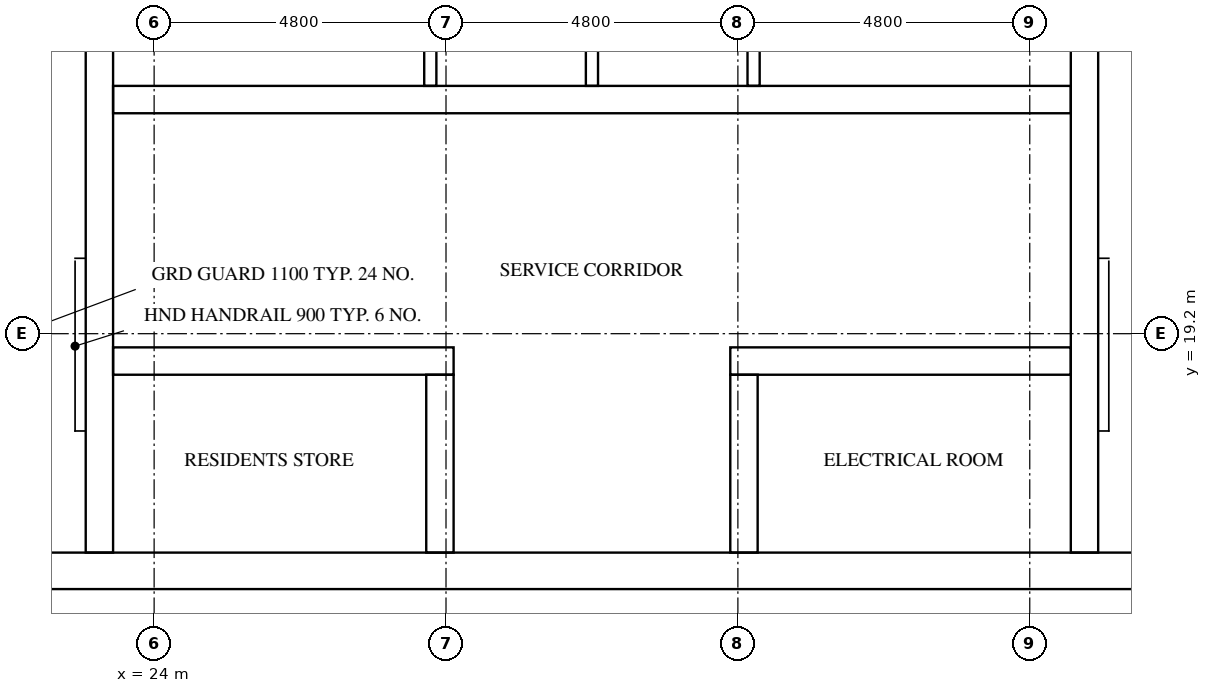
"""IFC4 building model, lengths in metres.
Left out: names, types, materials, properties, quantities, classifications, styles, units other than length and angle.
Written with IfcOpenShell. Run it as: python <this file> out.ifc"""

import sys

from ifc_helpers import new_model, si_unit, direction, frame, frame_2d, origin, place, context, subcontext, project, spatial, rectangle, extrude, element, fill, save


model = new_model("IFC4")
c1 = context("Model", 3, precision=1e-05, world=origin(), true_north=direction((0.0, 1.0)))
c2 = subcontext(c1, "Body", "Model", "MODEL_VIEW")
j1 = project(units=[si_unit("LENGTHUNIT", "METRE"), si_unit("PLANEANGLEUNIT", "RADIAN")], contexts=[c1])
p1 = place(None, origin())
s1 = spatial("IfcSite", under=j1, at=p1, CompositionType="ELEMENT")
p2 = place(p1, origin())
s2 = spatial("IfcBuilding", under=s1, at=p2, CompositionType="ELEMENT")
p3 = place(p2, frame((0.0, 0.0, 242.2)))
s3 = spatial("IfcBuildingStorey", under=s2, at=p3, CompositionType="ELEMENT", Elevation=242.2)
p4 = place(p3, frame((15.0, 15.3, 0.0), z_axis=(0.0, 0.0, 1.0), x_axis=(1.0, 0.0, 0.0)))
e1 = element("IfcWall", 1, at=p4, inside=s3, PredefinedType="SHEAR", context=c2, shape_type="SweptSolid", body=[
    extrude(rectangle(XDim=32.4, YDim=0.6, at=frame_2d((16.2, 0.0))), origin(), (0.0, 0.0, 1.0), 3.2),
])
p5 = place(p4, frame((15.3, 0.0, 0.0)))
e2 = element("IfcOpeningElement", 2, at=p5, cuts=e1, PredefinedType="OPENING", context=c2, shape_type="SweptSolid", body=[
    extrude(rectangle(XDim=1.8, YDim=2.1, at=frame_2d((0.9, 1.05))), frame((0.0, 0.31, 0.0), z_axis=(0.0, -1.0, 0.0), x_axis=(1.0, 0.0, 0.0)), (0.0, 0.0, 1.0), 0.62),
])
p6 = place(p3, frame((23.1, 15.6, 0.0), z_axis=(0.0, 0.0, 1.0), x_axis=(0.0, 1.0, 0.0)))
e3 = element("IfcWall", 3, at=p6, inside=s3, PredefinedType="SHEAR", context=c2, shape_type="SweptSolid", body=[
    extrude(rectangle(XDim=21.6, YDim=0.45, at=frame_2d((10.8, 0.0))), origin(), (0.0, 0.0, 1.0), 3.2),
])
p7 = place(p3, frame((39.3, 15.6, 0.0), z_axis=(0.0, 0.0, 1.0), x_axis=(0.0, 1.0, 0.0)))
e4 = element("IfcWall", 4, at=p7, inside=s3, PredefinedType="SHEAR", context=c2, shape_type="SweptSolid", body=[
    extrude(rectangle(XDim=8.65, YDim=0.45, at=frame_2d((4.325, 0.0))), origin(), (0.0, 0.0, 1.0), 3.2),
])
p8 = place(p3, frame((23.325, 18.75, 0.0), z_axis=(0.0, 0.0, 1.0), x_axis=(1.0, 0.0, 0.0)))
e5 = element("IfcWall", 5, at=p8, inside=s3, PredefinedType="SHEAR", context=c2, shape_type="SweptSolid", body=[
    extrude(rectangle(XDim=5.6, YDim=0.45, at=frame_2d((2.8, 0.0))), origin(), (0.0, 0.0, 1.0), 3.2),
])
p9 = place(p8, frame((2.075, 0.0, 0.0)))
e6 = element("IfcOpeningElement", 6, at=p9, cuts=e5, PredefinedType="OPENING", context=c2, shape_type="SweptSolid", body=[
    extrude(rectangle(XDim=1.0, YDim=2.1, at=frame_2d((0.5, 1.05))), frame((0.0, 0.235, 0.0), z_axis=(0.0, -1.0, 0.0), x_axis=(1.0, 0.0, 0.0)), (0.0, 0.0, 1.0), 0.47),
])
p10 = place(p3, frame((33.475, 18.75, 0.0), z_axis=(0.0, 0.0, 1.0), x_axis=(1.0, 0.0, 0.0)))
e7 = element("IfcWall", 7, at=p10, inside=s3, PredefinedType="SHEAR", context=c2, shape_type="SweptSolid", body=[
    extrude(rectangle(XDim=5.6, YDim=0.45, at=frame_2d((2.8, 0.0))), origin(), (0.0, 0.0, 1.0), 3.2),
])
p11 = place(p10, frame((2.525, 0.0, 0.0)))
e8 = element("IfcOpeningElement", 8, at=p11, cuts=e7, PredefinedType="OPENING", context=c2, shape_type="SweptSolid", body=[
    extrude(rectangle(XDim=1.0, YDim=2.1, at=frame_2d((0.5, 1.05))), frame((0.0, 0.235, 0.0), z_axis=(0.0, -1.0, 0.0), x_axis=(1.0, 0.0, 0.0)), (0.0, 0.0, 1.0), 0.47),
])
p12 = place(p3, frame((23.325, 23.05, 0.0), z_axis=(0.0, 0.0, 1.0), x_axis=(1.0, 0.0, 0.0)))
e9 = element("IfcWall", 9, at=p12, inside=s3, PredefinedType="SHEAR", context=c2, shape_type="SweptSolid", body=[
    extrude(rectangle(XDim=15.75, YDim=0.45, at=frame_2d((7.875, 0.0))), origin(), (0.0, 0.0, 1.0), 3.2),
])
p13 = place(p12, frame((2.058, 0.0, 0.0)))
e10 = element("IfcOpeningElement", 10, at=p13, cuts=e9, PredefinedType="OPENING", context=c2, shape_type="SweptSolid", body=[
    extrude(rectangle(XDim=1.0, YDim=2.1, at=frame_2d((0.5, 1.05))), frame((0.0, 0.235, 0.0), z_axis=(0.0, -1.0, 0.0), x_axis=(1.0, 0.0, 0.0)), (0.0, 0.0, 1.0), 0.47),
])
p14 = place(p12, frame((12.692, 0.0, 0.0)))
e11 = element("IfcOpeningElement", 11, at=p14, cuts=e9, PredefinedType="OPENING", context=c2, shape_type="SweptSolid", body=[
    extrude(rectangle(XDim=1.0, YDim=2.1, at=frame_2d((0.5, 1.05))), frame((0.0, 0.235, 0.0), z_axis=(0.0, -1.0, 0.0), x_axis=(1.0, 0.0, 0.0)), (0.0, 0.0, 1.0), 0.47),
])
for number, where, z_axis, x_axis in (
    (12, (28.7, 15.6, 0.0), (0.0, 0.0, 1.0), (0.0, 1.0, 0.0)),
    (13, (33.7, 15.6, 0.0), (0.0, 0.0, 1.0), (0.0, 1.0, 0.0)),
):
    element("IfcWall", number, at=place(p3, frame(where, z_axis=z_axis, x_axis=x_axis)), inside=s3, PredefinedType="SHEAR", context=c2, shape_type="SweptSolid", body=[
        extrude(rectangle(XDim=2.925, YDim=0.45, at=frame_2d((1.462, 0.0))), origin(), (0.0, 0.0, 1.0), 3.2),
    ])
for number, where, z_axis, x_axis in (
    (14, (28.542, 23.275, 0.0), (0.0, 0.0, 1.0), (0.0, 1.0, 0.0)),
    (15, (31.2, 23.275, 0.0), (0.0, 0.0, 1.0), (0.0, 1.0, 0.0)),
    (16, (33.858, 23.275, 0.0), (0.0, 0.0, 1.0), (0.0, 1.0, 0.0)),
):
    element("IfcWall", number, at=place(p3, frame(where, z_axis=z_axis, x_axis=x_axis)), inside=s3, PredefinedType="SOLIDWALL", context=c2, shape_type="SweptSolid", body=[
        extrude(rectangle(XDim=2.65, YDim=0.2, at=frame_2d((1.325, 0.0))), origin(), (0.0, 0.0, 1.0), 3.2),
    ])
p15 = place(p5, frame((1.8, 0.0, 0.0), z_axis=(0.0, 0.0, 1.0), x_axis=(-1.0, 0.0, 0.0)))
e17 = element("IfcDoor", 17, at=p15, inside=s3, OperationType="DOUBLE_DOOR_SINGLE_SWING", PredefinedType="DOOR", context=c2, shape_type="SweptSolid", body=[
    extrude(rectangle(XDim=1.8, YDim=2.1, at=frame_2d((0.9, 1.05))), frame((0.0, 0.025, 0.0), z_axis=(0.0, -1.0, 0.0), x_axis=(1.0, 0.0, 0.0)), (0.0, 0.0, 1.0), 0.05),
])
fill(e2, e17)
p16 = place(p13, frame((1.0, 0.0, 0.0), z_axis=(0.0, 0.0, 1.0), x_axis=(-1.0, 0.0, 0.0)))
e18 = element("IfcDoor", 18, at=p16, inside=s3, OperationType="SINGLE_SWING_RIGHT", PredefinedType="DOOR", context=c2, shape_type="SweptSolid", body=[
    extrude(rectangle(XDim=1.0, YDim=2.1, at=frame_2d((0.5, 1.05))), frame((0.0, 0.025, 0.0), z_axis=(0.0, -1.0, 0.0), x_axis=(1.0, 0.0, 0.0)), (0.0, 0.0, 1.0), 0.05),
])
fill(e10, e18)
p17 = place(p14, frame((1.0, 0.0, 0.0), z_axis=(0.0, 0.0, 1.0), x_axis=(-1.0, 0.0, 0.0)))
e19 = element("IfcDoor", 19, at=p17, inside=s3, OperationType="SINGLE_SWING_LEFT", PredefinedType="DOOR", context=c2, shape_type="SweptSolid", body=[
    extrude(rectangle(XDim=1.0, YDim=2.1, at=frame_2d((0.5, 1.05))), frame((0.0, 0.025, 0.0), z_axis=(0.0, -1.0, 0.0), x_axis=(1.0, 0.0, 0.0)), (0.0, 0.0, 1.0), 0.05),
])
fill(e11, e19)
p18 = place(p9, origin())
e20 = element("IfcDoor", 20, at=p18, inside=s3, OperationType="SINGLE_SWING_RIGHT", PredefinedType="DOOR", context=c2, shape_type="SweptSolid", body=[
    extrude(rectangle(XDim=1.0, YDim=2.1, at=frame_2d((0.5, 1.05))), frame((0.0, 0.025, 0.0), z_axis=(0.0, -1.0, 0.0), x_axis=(1.0, 0.0, 0.0)), (0.0, 0.0, 1.0), 0.05),
])
fill(e6, e20)
p19 = place(p11, origin())
e21 = element("IfcDoor", 21, at=p19, inside=s3, OperationType="SINGLE_SWING_LEFT", PredefinedType="DOOR", context=c2, shape_type="SweptSolid", body=[
    extrude(rectangle(XDim=1.0, YDim=2.1, at=frame_2d((0.5, 1.05))), frame((0.0, 0.025, 0.0), z_axis=(0.0, -1.0, 0.0), x_axis=(1.0, 0.0, 0.0)), (0.0, 0.0, 1.0), 0.05),
])
fill(e8, e21)
save(model, sys.argv[1])
